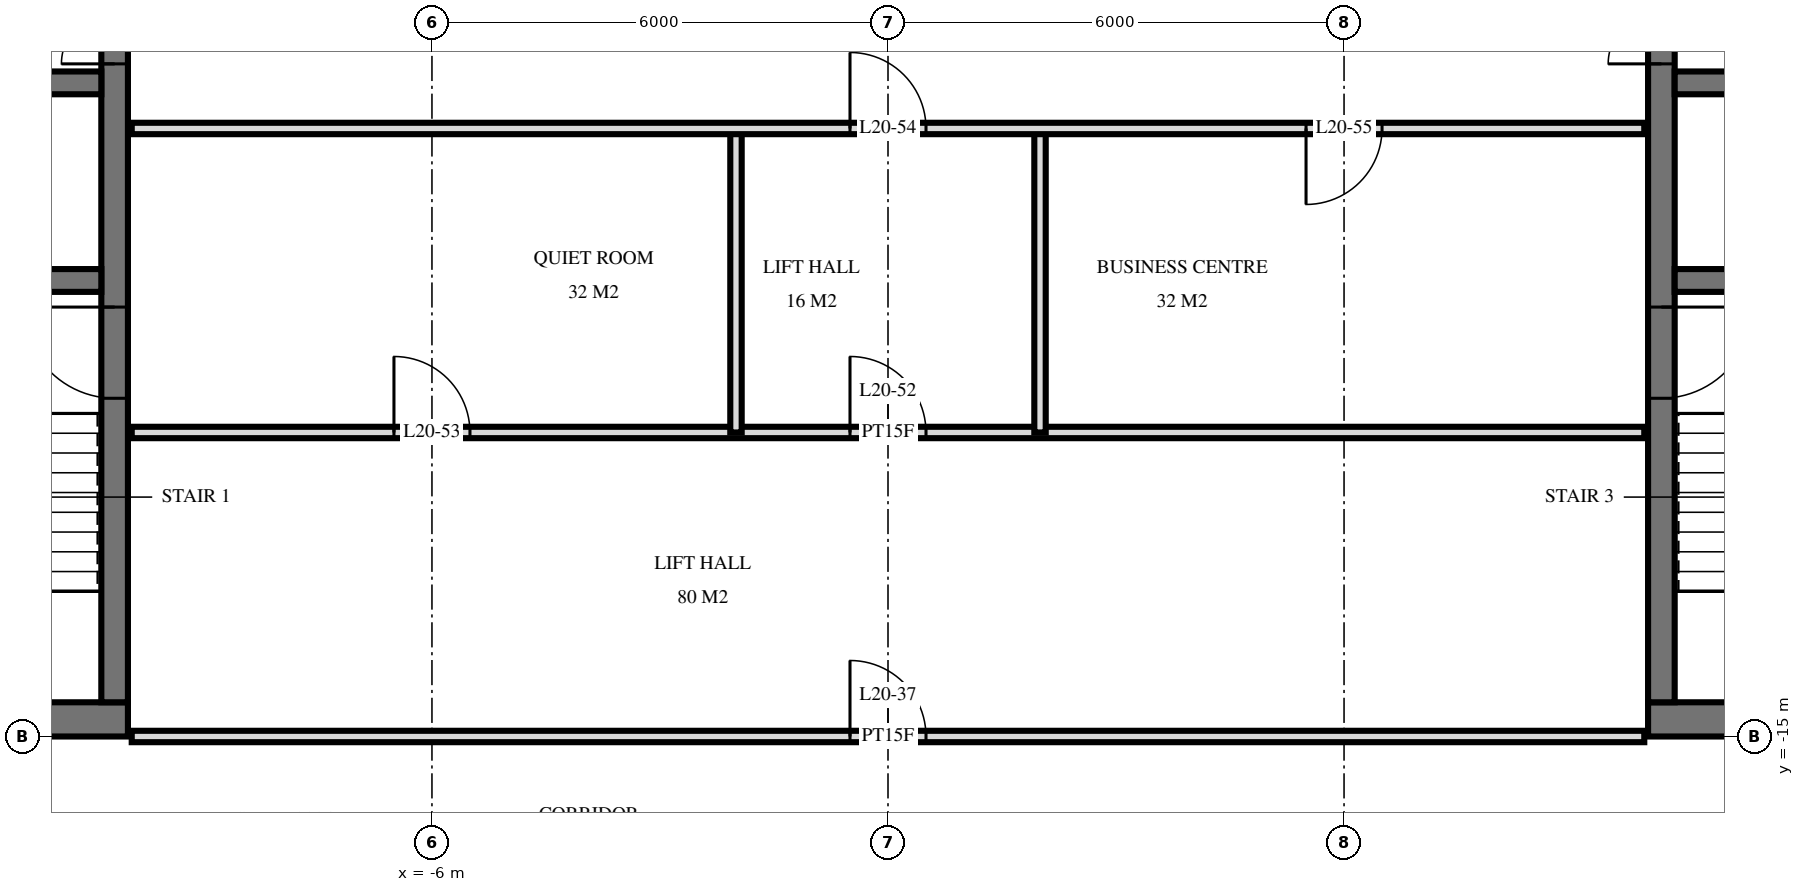
"""IFC4 building model, lengths in metres.
Left out: names, types, materials, properties, quantities, classifications, styles, units other than length and angle.
Written with IfcOpenShell. Run it as: python <this file> out.ifc"""

import sys

from ifc_helpers import new_model, si_unit, direction, frame, frame_2d, origin, place, context, subcontext, project, spatial, rectangle, extrude, element, fill, save


model = new_model("IFC4")
c1 = context("Model", 3, precision=1e-05, world=origin(), true_north=direction((0.0, 1.0)))
c2 = subcontext(c1, "Body", "Model", "MODEL_VIEW")
j1 = project(units=[si_unit("LENGTHUNIT", "METRE"), si_unit("PLANEANGLEUNIT", "RADIAN")], contexts=[c1])
p1 = place(None, origin())
s1 = spatial("IfcSite", under=j1, at=p1, CompositionType="ELEMENT")
p2 = place(p1, origin())
s2 = spatial("IfcBuilding", under=s1, at=p2, CompositionType="ELEMENT")
p3 = place(p2, frame((0.0, 0.0, 81.6)))
s3 = spatial("IfcBuildingStorey", under=s2, at=p3, CompositionType="ELEMENT", Elevation=81.6)
p4 = place(p3, frame((-29.5, -14.775, 0.0), z_axis=(0.0, 0.0, 1.0), x_axis=(1.0, 0.0, 0.0)))
e1 = element("IfcWall", 1, at=p4, inside=s3, PredefinedType="SHEAR", context=c2, shape_type="SweptSolid", body=[
    extrude(rectangle(XDim=19.5, YDim=0.45, at=frame_2d((9.75, 0.0))), origin(), (0.0, 0.0, 1.0), 3.6),
])
p5 = place(p4, frame((11.2, 0.0, 0.0)))
e2 = element("IfcOpeningElement", 2, at=p5, cuts=e1, PredefinedType="OPENING", context=c2, shape_type="SweptSolid", body=[
    extrude(rectangle(XDim=1.2, YDim=2.1, at=frame_2d((0.6, 1.05))), frame((0.0, 0.235, 0.0), z_axis=(0.0, -1.0, 0.0), x_axis=(1.0, 0.0, 0.0)), (0.0, 0.0, 1.0), 0.47),
])
p6 = place(p4, frame((14.25, 0.0, 0.0)))
e3 = element("IfcOpeningElement", 3, at=p6, cuts=e1, PredefinedType="OPENING", context=c2, shape_type="SweptSolid", body=[
    extrude(rectangle(XDim=1.1, YDim=2.1, at=frame_2d((0.55, 1.05))), frame((0.0, 0.235, 0.0), z_axis=(0.0, -1.0, 0.0), x_axis=(1.0, 0.0, 0.0)), (0.0, 0.0, 1.0), 0.47),
])
p7 = place(p4, frame((8.5, 0.0, 0.0)))
e4 = element("IfcOpeningElement", 4, at=p7, cuts=e1, PredefinedType="OPENING", context=c2, shape_type="SweptSolid", body=[
    extrude(rectangle(XDim=0.9, YDim=2.1, at=frame_2d((0.45, 1.05))), frame((0.0, 0.235, 0.0), z_axis=(0.0, -1.0, 0.0), x_axis=(1.0, 0.0, 0.0)), (0.0, 0.0, 1.0), 0.47),
])
p8 = place(p4, frame((6.05, 0.0, 0.0)))
e5 = element("IfcOpeningElement", 5, at=p8, cuts=e1, PredefinedType="OPENING", context=c2, shape_type="SweptSolid", body=[
    extrude(rectangle(XDim=1.0, YDim=2.1, at=frame_2d((0.5, 1.05))), frame((0.0, 0.235, 0.0), z_axis=(0.0, -1.0, 0.0), x_axis=(1.0, 0.0, 0.0)), (0.0, 0.0, 1.0), 0.47),
])
p9 = place(p4, frame((2.988, 0.0, 0.0)))
e6 = element("IfcOpeningElement", 6, at=p9, cuts=e1, PredefinedType="OPENING", context=c2, shape_type="SweptSolid", body=[
    extrude(rectangle(XDim=1.0, YDim=2.1, at=frame_2d((0.5, 1.05))), frame((0.0, 0.235, 0.0), z_axis=(0.0, -1.0, 0.0), x_axis=(1.0, 0.0, 0.0)), (0.0, 0.0, 1.0), 0.47),
])
p10 = place(p4, frame((0.663, 0.0, 0.0)))
e7 = element("IfcOpeningElement", 7, at=p10, cuts=e1, PredefinedType="OPENING", context=c2, shape_type="SweptSolid", body=[
    extrude(rectangle(XDim=1.0, YDim=2.1, at=frame_2d((0.5, 1.05))), frame((0.0, 0.235, 0.0), z_axis=(0.0, -1.0, 0.0), x_axis=(1.0, 0.0, 0.0)), (0.0, 0.0, 1.0), 0.47),
])
p11 = place(p3, frame((-10.175, -14.55, 0.0), z_axis=(0.0, 0.0, 1.0), x_axis=(0.0, 1.0, 0.0)))
e8 = element("IfcWall", 8, at=p11, inside=s3, PredefinedType="SHEAR", context=c2, shape_type="SweptSolid", body=[
    extrude(rectangle(XDim=14.1, YDim=0.35, at=frame_2d((7.05, 0.0))), origin(), (0.0, 0.0, 1.0), 3.6),
])
p12 = place(p11, frame((8.4, 0.0, 0.0)))
e9 = element("IfcOpeningElement", 9, at=p12, cuts=e8, PredefinedType="OPENING", context=c2, shape_type="SweptSolid", body=[
    extrude(rectangle(XDim=1.4, YDim=2.4, at=frame_2d((0.7, 1.2))), frame((0.0, 0.185, 0.0), z_axis=(0.0, -1.0, 0.0), x_axis=(1.0, 0.0, 0.0)), (0.0, 0.0, 1.0), 0.37),
])
p13 = place(p11, frame((10.0, 0.0, 0.0)))
e10 = element("IfcOpeningElement", 10, at=p13, cuts=e8, PredefinedType="OPENING", context=c2, shape_type="SweptSolid", body=[
    extrude(rectangle(XDim=1.4, YDim=2.4, at=frame_2d((0.7, 1.2))), frame((0.0, 0.185, 0.0), z_axis=(0.0, -1.0, 0.0), x_axis=(1.0, 0.0, 0.0)), (0.0, 0.0, 1.0), 0.37),
])
p14 = place(p11, frame((4.0, 0.0, 0.0)))
e11 = element("IfcOpeningElement", 11, at=p14, cuts=e8, PredefinedType="OPENING", context=c2, shape_type="SweptSolid", body=[
    extrude(rectangle(XDim=1.2, YDim=2.1, at=frame_2d((0.6, 1.05))), frame((0.0, 0.185, 0.0), z_axis=(0.0, -1.0, 0.0), x_axis=(1.0, 0.0, 0.0)), (0.0, 0.0, 1.0), 0.37),
])
p15 = place(p3, frame((-29.05, -6.4, 0.0), z_axis=(0.0, 0.0, 1.0), x_axis=(1.0, 0.0, 0.0)))
e12 = element("IfcWall", 12, at=p15, inside=s3, PredefinedType="SHEAR", context=c2, shape_type="SweptSolid", body=[
    extrude(rectangle(XDim=18.7, YDim=0.3, at=frame_2d((9.35, 0.0))), origin(), (0.0, 0.0, 1.0), 3.6),
])
p16 = place(p15, frame((2.95, 0.0, 0.0)))
e13 = element("IfcOpeningElement", 13, at=p16, cuts=e12, PredefinedType="OPENING", context=c2, shape_type="SweptSolid", body=[
    extrude(rectangle(XDim=1.1, YDim=2.1, at=frame_2d((0.55, 1.05))), frame((0.0, 0.16, 0.0), z_axis=(0.0, -1.0, 0.0), x_axis=(1.0, 0.0, 0.0)), (0.0, 0.0, 1.0), 0.32),
])
p17 = place(p15, frame((0.55, 0.0, 0.0)))
e14 = element("IfcOpeningElement", 14, at=p17, cuts=e12, PredefinedType="OPENING", context=c2, shape_type="SweptSolid", body=[
    extrude(rectangle(XDim=1.1, YDim=2.1, at=frame_2d((0.55, 1.05))), frame((0.0, 0.16, 0.0), z_axis=(0.0, -1.0, 0.0), x_axis=(1.0, 0.0, 0.0)), (0.0, 0.0, 1.0), 0.32),
])
p18 = place(p15, frame((10.8, 0.0, 0.0)))
e15 = element("IfcOpeningElement", 15, at=p18, cuts=e12, PredefinedType="OPENING", context=c2, shape_type="SweptSolid", body=[
    extrude(rectangle(XDim=1.1, YDim=2.1, at=frame_2d((0.55, 1.05))), frame((0.0, 0.16, 0.0), z_axis=(0.0, -1.0, 0.0), x_axis=(1.0, 0.0, 0.0)), (0.0, 0.0, 1.0), 0.32),
])
p19 = place(p15, frame((5.6, 0.0, 0.0)))
e16 = element("IfcOpeningElement", 16, at=p19, cuts=e12, PredefinedType="OPENING", context=c2, shape_type="SweptSolid", body=[
    extrude(rectangle(XDim=1.0, YDim=2.1, at=frame_2d((0.5, 1.05))), frame((0.0, 0.16, 0.0), z_axis=(0.0, -1.0, 0.0), x_axis=(1.0, 0.0, 0.0)), (0.0, 0.0, 1.0), 0.32),
])
p20 = place(p3, frame((-29.05, -9.0, 0.0), z_axis=(0.0, 0.0, 1.0), x_axis=(1.0, 0.0, 0.0)))
e17 = element("IfcWall", 17, at=p20, inside=s3, PredefinedType="SHEAR", context=c2, shape_type="SweptSolid", body=[
    extrude(rectangle(XDim=18.7, YDim=0.3, at=frame_2d((9.35, 0.0))), origin(), (0.0, 0.0, 1.0), 3.6),
])
p21 = place(p20, frame((13.8, 0.0, 0.0)))
e18 = element("IfcOpeningElement", 18, at=p21, cuts=e17, PredefinedType="OPENING", context=c2, shape_type="SweptSolid", body=[
    extrude(rectangle(XDim=1.1, YDim=2.1, at=frame_2d((0.55, 1.05))), frame((0.0, 0.16, 0.0), z_axis=(0.0, -1.0, 0.0), x_axis=(1.0, 0.0, 0.0)), (0.0, 0.0, 1.0), 0.32),
])
p22 = place(p3, frame((10.0, -14.775, 0.0), z_axis=(0.0, 0.0, 1.0), x_axis=(1.0, 0.0, 0.0)))
e19 = element("IfcWall", 19, at=p22, inside=s3, PredefinedType="SHEAR", context=c2, shape_type="SweptSolid", body=[
    extrude(rectangle(XDim=19.5, YDim=0.45, at=frame_2d((9.75, 0.0))), origin(), (0.0, 0.0, 1.0), 3.6),
])
p23 = place(p22, frame((7.1, 0.0, 0.0)))
e20 = element("IfcOpeningElement", 20, at=p23, cuts=e19, PredefinedType="OPENING", context=c2, shape_type="SweptSolid", body=[
    extrude(rectangle(XDim=1.2, YDim=2.1, at=frame_2d((0.6, 1.05))), frame((0.0, 0.235, 0.0), z_axis=(0.0, -1.0, 0.0), x_axis=(1.0, 0.0, 0.0)), (0.0, 0.0, 1.0), 0.47),
])
p24 = place(p22, frame((4.15, 0.0, 0.0)))
e21 = element("IfcOpeningElement", 21, at=p24, cuts=e19, PredefinedType="OPENING", context=c2, shape_type="SweptSolid", body=[
    extrude(rectangle(XDim=1.1, YDim=2.1, at=frame_2d((0.55, 1.05))), frame((0.0, 0.235, 0.0), z_axis=(0.0, -1.0, 0.0), x_axis=(1.0, 0.0, 0.0)), (0.0, 0.0, 1.0), 0.47),
])
p25 = place(p22, frame((10.1, 0.0, 0.0)))
e22 = element("IfcOpeningElement", 22, at=p25, cuts=e19, PredefinedType="OPENING", context=c2, shape_type="SweptSolid", body=[
    extrude(rectangle(XDim=0.9, YDim=2.1, at=frame_2d((0.45, 1.05))), frame((0.0, 0.235, 0.0), z_axis=(0.0, -1.0, 0.0), x_axis=(1.0, 0.0, 0.0)), (0.0, 0.0, 1.0), 0.47),
])
p26 = place(p22, frame((12.45, 0.0, 0.0)))
e23 = element("IfcOpeningElement", 23, at=p26, cuts=e19, PredefinedType="OPENING", context=c2, shape_type="SweptSolid", body=[
    extrude(rectangle(XDim=1.0, YDim=2.1, at=frame_2d((0.5, 1.05))), frame((0.0, 0.235, 0.0), z_axis=(0.0, -1.0, 0.0), x_axis=(1.0, 0.0, 0.0)), (0.0, 0.0, 1.0), 0.47),
])
p27 = place(p22, frame((15.512, 0.0, 0.0)))
e24 = element("IfcOpeningElement", 24, at=p27, cuts=e19, PredefinedType="OPENING", context=c2, shape_type="SweptSolid", body=[
    extrude(rectangle(XDim=1.0, YDim=2.1, at=frame_2d((0.5, 1.05))), frame((0.0, 0.235, 0.0), z_axis=(0.0, -1.0, 0.0), x_axis=(1.0, 0.0, 0.0)), (0.0, 0.0, 1.0), 0.47),
])
p28 = place(p22, frame((17.837, 0.0, 0.0)))
e25 = element("IfcOpeningElement", 25, at=p28, cuts=e19, PredefinedType="OPENING", context=c2, shape_type="SweptSolid", body=[
    extrude(rectangle(XDim=1.0, YDim=2.1, at=frame_2d((0.5, 1.05))), frame((0.0, 0.235, 0.0), z_axis=(0.0, -1.0, 0.0), x_axis=(1.0, 0.0, 0.0)), (0.0, 0.0, 1.0), 0.47),
])
p29 = place(p3, frame((10.175, -14.55, 0.0), z_axis=(0.0, 0.0, 1.0), x_axis=(0.0, 1.0, 0.0)))
e26 = element("IfcWall", 26, at=p29, inside=s3, PredefinedType="SHEAR", context=c2, shape_type="SweptSolid", body=[
    extrude(rectangle(XDim=14.1, YDim=0.35, at=frame_2d((7.05, 0.0))), origin(), (0.0, 0.0, 1.0), 3.6),
])
p30 = place(p29, frame((8.4, 0.0, 0.0)))
e27 = element("IfcOpeningElement", 27, at=p30, cuts=e26, PredefinedType="OPENING", context=c2, shape_type="SweptSolid", body=[
    extrude(rectangle(XDim=1.4, YDim=2.4, at=frame_2d((0.7, 1.2))), frame((0.0, 0.185, 0.0), z_axis=(0.0, -1.0, 0.0), x_axis=(1.0, 0.0, 0.0)), (0.0, 0.0, 1.0), 0.37),
])
p31 = place(p29, frame((10.0, 0.0, 0.0)))
e28 = element("IfcOpeningElement", 28, at=p31, cuts=e26, PredefinedType="OPENING", context=c2, shape_type="SweptSolid", body=[
    extrude(rectangle(XDim=1.4, YDim=2.4, at=frame_2d((0.7, 1.2))), frame((0.0, 0.185, 0.0), z_axis=(0.0, -1.0, 0.0), x_axis=(1.0, 0.0, 0.0)), (0.0, 0.0, 1.0), 0.37),
])
p32 = place(p29, frame((4.0, 0.0, 0.0)))
e29 = element("IfcOpeningElement", 29, at=p32, cuts=e26, PredefinedType="OPENING", context=c2, shape_type="SweptSolid", body=[
    extrude(rectangle(XDim=1.2, YDim=2.1, at=frame_2d((0.6, 1.05))), frame((0.0, 0.185, 0.0), z_axis=(0.0, -1.0, 0.0), x_axis=(1.0, 0.0, 0.0)), (0.0, 0.0, 1.0), 0.37),
])
p33 = place(p3, frame((10.35, -6.4, 0.0), z_axis=(0.0, 0.0, 1.0), x_axis=(1.0, 0.0, 0.0)))
e30 = element("IfcWall", 30, at=p33, inside=s3, PredefinedType="SHEAR", context=c2, shape_type="SweptSolid", body=[
    extrude(rectangle(XDim=18.7, YDim=0.3, at=frame_2d((9.35, 0.0))), origin(), (0.0, 0.0, 1.0), 3.6),
])
p34 = place(p33, frame((14.65, 0.0, 0.0)))
e31 = element("IfcOpeningElement", 31, at=p34, cuts=e30, PredefinedType="OPENING", context=c2, shape_type="SweptSolid", body=[
    extrude(rectangle(XDim=1.1, YDim=2.1, at=frame_2d((0.55, 1.05))), frame((0.0, 0.16, 0.0), z_axis=(0.0, -1.0, 0.0), x_axis=(1.0, 0.0, 0.0)), (0.0, 0.0, 1.0), 0.32),
])
p35 = place(p33, frame((17.05, 0.0, 0.0)))
e32 = element("IfcOpeningElement", 32, at=p35, cuts=e30, PredefinedType="OPENING", context=c2, shape_type="SweptSolid", body=[
    extrude(rectangle(XDim=1.1, YDim=2.1, at=frame_2d((0.55, 1.05))), frame((0.0, 0.16, 0.0), z_axis=(0.0, -1.0, 0.0), x_axis=(1.0, 0.0, 0.0)), (0.0, 0.0, 1.0), 0.32),
])
p36 = place(p33, frame((6.8, 0.0, 0.0)))
e33 = element("IfcOpeningElement", 33, at=p36, cuts=e30, PredefinedType="OPENING", context=c2, shape_type="SweptSolid", body=[
    extrude(rectangle(XDim=1.1, YDim=2.1, at=frame_2d((0.55, 1.05))), frame((0.0, 0.16, 0.0), z_axis=(0.0, -1.0, 0.0), x_axis=(1.0, 0.0, 0.0)), (0.0, 0.0, 1.0), 0.32),
])
p37 = place(p33, frame((12.1, 0.0, 0.0)))
e34 = element("IfcOpeningElement", 34, at=p37, cuts=e30, PredefinedType="OPENING", context=c2, shape_type="SweptSolid", body=[
    extrude(rectangle(XDim=1.0, YDim=2.1, at=frame_2d((0.5, 1.05))), frame((0.0, 0.16, 0.0), z_axis=(0.0, -1.0, 0.0), x_axis=(1.0, 0.0, 0.0)), (0.0, 0.0, 1.0), 0.32),
])
p38 = place(p3, frame((10.35, -9.0, 0.0), z_axis=(0.0, 0.0, 1.0), x_axis=(1.0, 0.0, 0.0)))
e35 = element("IfcWall", 35, at=p38, inside=s3, PredefinedType="SHEAR", context=c2, shape_type="SweptSolid", body=[
    extrude(rectangle(XDim=18.7, YDim=0.3, at=frame_2d((9.35, 0.0))), origin(), (0.0, 0.0, 1.0), 3.6),
])
p39 = place(p38, frame((3.8, 0.0, 0.0)))
e36 = element("IfcOpeningElement", 36, at=p39, cuts=e35, PredefinedType="OPENING", context=c2, shape_type="SweptSolid", body=[
    extrude(rectangle(XDim=1.1, YDim=2.1, at=frame_2d((0.55, 1.05))), frame((0.0, 0.16, 0.0), z_axis=(0.0, -1.0, 0.0), x_axis=(1.0, 0.0, 0.0)), (0.0, 0.0, 1.0), 0.32),
])
for number, where, z_axis, x_axis in (
    (37, (2.0, -11.0, 0.0), (0.0, 0.0, 1.0), (0.0, 1.0, 0.0)),
    (38, (-2.0, -11.0, 0.0), (0.0, 0.0, 1.0), (0.0, 1.0, 0.0)),
):
    element("IfcWall", number, at=place(p3, frame(where, z_axis=z_axis, x_axis=x_axis)), inside=s3, PredefinedType="PARTITIONING", context=c2, shape_type="SweptSolid", body=[
        extrude(rectangle(XDim=4.0, YDim=0.15, at=frame_2d((2.0, 0.0))), origin(), (0.0, 0.0, 1.0), 3.32),
    ])
p40 = place(p3, frame((-9.95, -15.0, 0.0), z_axis=(0.0, 0.0, 1.0), x_axis=(1.0, 0.0, 0.0)))
e39 = element("IfcWall", 39, at=p40, inside=s3, PredefinedType="PARTITIONING", context=c2, shape_type="SweptSolid", body=[
    extrude(rectangle(XDim=19.9, YDim=0.15, at=frame_2d((9.95, 0.0))), origin(), (0.0, 0.0, 1.0), 2.684),
])
p41 = place(p40, frame((9.45, 0.0, 0.0)))
e40 = element("IfcOpeningElement", 40, at=p41, cuts=e39, PredefinedType="OPENING", context=c2, shape_type="SweptSolid", body=[
    extrude(rectangle(XDim=1.0, YDim=2.1, at=frame_2d((0.5, 1.05))), frame((0.0, 0.085, 0.0), z_axis=(0.0, -1.0, 0.0), x_axis=(1.0, 0.0, 0.0)), (0.0, 0.0, 1.0), 0.17),
])
p42 = place(p3, frame((-9.95, -11.0, 0.0), z_axis=(0.0, 0.0, 1.0), x_axis=(1.0, 0.0, 0.0)))
e41 = element("IfcWall", 41, at=p42, inside=s3, PredefinedType="PARTITIONING", context=c2, shape_type="SweptSolid", body=[
    extrude(rectangle(XDim=19.9, YDim=0.15, at=frame_2d((9.95, 0.0))), origin(), (0.0, 0.0, 1.0), 3.32),
])
p43 = place(p42, frame((9.45, 0.0, 0.0)))
e42 = element("IfcOpeningElement", 42, at=p43, cuts=e41, PredefinedType="OPENING", context=c2, shape_type="SweptSolid", body=[
    extrude(rectangle(XDim=1.0, YDim=2.1, at=frame_2d((0.5, 1.05))), frame((0.0, 0.085, 0.0), z_axis=(0.0, -1.0, 0.0), x_axis=(1.0, 0.0, 0.0)), (0.0, 0.0, 1.0), 0.17),
])
p44 = place(p42, frame((3.45, 0.0, 0.0)))
e43 = element("IfcOpeningElement", 43, at=p44, cuts=e41, PredefinedType="OPENING", context=c2, shape_type="SweptSolid", body=[
    extrude(rectangle(XDim=1.0, YDim=2.1, at=frame_2d((0.5, 1.05))), frame((0.0, 0.085, 0.0), z_axis=(0.0, -1.0, 0.0), x_axis=(1.0, 0.0, 0.0)), (0.0, 0.0, 1.0), 0.17),
])
p45 = place(p3, frame((-9.95, -7.0, 0.0), z_axis=(0.0, 0.0, 1.0), x_axis=(1.0, 0.0, 0.0)))
e44 = element("IfcWall", 44, at=p45, inside=s3, PredefinedType="PARTITIONING", context=c2, shape_type="SweptSolid", body=[
    extrude(rectangle(XDim=19.9, YDim=0.15, at=frame_2d((9.95, 0.0))), origin(), (0.0, 0.0, 1.0), 3.32),
])
p46 = place(p45, frame((9.45, 0.0, 0.0)))
e45 = element("IfcOpeningElement", 45, at=p46, cuts=e44, PredefinedType="OPENING", context=c2, shape_type="SweptSolid", body=[
    extrude(rectangle(XDim=1.0, YDim=2.1, at=frame_2d((0.5, 1.05))), frame((0.0, 0.085, 0.0), z_axis=(0.0, -1.0, 0.0), x_axis=(1.0, 0.0, 0.0)), (0.0, 0.0, 1.0), 0.17),
])
p47 = place(p45, frame((15.45, 0.0, 0.0)))
e46 = element("IfcOpeningElement", 46, at=p47, cuts=e44, PredefinedType="OPENING", context=c2, shape_type="SweptSolid", body=[
    extrude(rectangle(XDim=1.0, YDim=2.1, at=frame_2d((0.5, 1.05))), frame((0.0, 0.085, 0.0), z_axis=(0.0, -1.0, 0.0), x_axis=(1.0, 0.0, 0.0)), (0.0, 0.0, 1.0), 0.17),
])
p48 = place(p12, origin())
e47 = element("IfcDoor", 47, at=p48, inside=s3, OperationType="DOUBLE_DOOR_SINGLE_SWING", PredefinedType="DOOR", context=c2, shape_type="SweptSolid", body=[
    extrude(rectangle(XDim=1.4, YDim=2.4, at=frame_2d((0.7, 1.2))), frame((0.0, 0.025, 0.0), z_axis=(0.0, -1.0, 0.0), x_axis=(1.0, 0.0, 0.0)), (0.0, 0.0, 1.0), 0.05),
])
fill(e9, e47)
p49 = place(p14, origin())
e48 = element("IfcDoor", 48, at=p49, inside=s3, OperationType="SINGLE_SWING_LEFT", PredefinedType="DOOR", context=c2, shape_type="SweptSolid", body=[
    extrude(rectangle(XDim=1.2, YDim=2.1, at=frame_2d((0.6, 1.05))), frame((0.0, 0.025, 0.0), z_axis=(0.0, -1.0, 0.0), x_axis=(1.0, 0.0, 0.0)), (0.0, 0.0, 1.0), 0.05),
])
fill(e11, e48)
p50 = place(p30, origin())
e49 = element("IfcDoor", 49, at=p50, inside=s3, OperationType="DOUBLE_DOOR_SINGLE_SWING", PredefinedType="DOOR", context=c2, shape_type="SweptSolid", body=[
    extrude(rectangle(XDim=1.4, YDim=2.4, at=frame_2d((0.7, 1.2))), frame((0.0, 0.025, 0.0), z_axis=(0.0, -1.0, 0.0), x_axis=(1.0, 0.0, 0.0)), (0.0, 0.0, 1.0), 0.05),
])
fill(e27, e49)
p51 = place(p32, frame((0.6, 0.0, 0.0), z_axis=(0.0, 0.0, 1.0), x_axis=(-1.0, 0.0, 0.0)))
e50 = element("IfcDoor", 50, at=p51, inside=s3, OperationType="SINGLE_SWING_RIGHT", PredefinedType="DOOR", context=c2, shape_type="SweptSolid", body=[
    extrude(rectangle(XDim=1.2, YDim=2.1, at=frame_2d((0.0, 1.05))), frame((0.0, -0.025, 0.0), z_axis=(0.0, 1.0, 0.0), x_axis=(-1.0, 0.0, 0.0)), (0.0, 0.0, 1.0), 0.05),
])
fill(e29, e50)
p52 = place(p41, origin())
e51 = element("IfcDoor", 51, at=p52, inside=s3, OperationType="SINGLE_SWING_RIGHT", PredefinedType="DOOR", context=c2, shape_type="SweptSolid", body=[
    extrude(rectangle(XDim=1.0, YDim=2.1, at=frame_2d((0.5, 1.05))), frame((0.0, 0.025, 0.0), z_axis=(0.0, -1.0, 0.0), x_axis=(1.0, 0.0, 0.0)), (0.0, 0.0, 1.0), 0.05),
])
fill(e40, e51)
p53 = place(p43, origin())
e52 = element("IfcDoor", 52, at=p53, inside=s3, OperationType="SINGLE_SWING_RIGHT", PredefinedType="DOOR", context=c2, shape_type="SweptSolid", body=[
    extrude(rectangle(XDim=1.0, YDim=2.1, at=frame_2d((0.5, 1.05))), frame((0.0, 0.025, 0.0), z_axis=(0.0, -1.0, 0.0), x_axis=(1.0, 0.0, 0.0)), (0.0, 0.0, 1.0), 0.05),
])
fill(e42, e52)
p54 = place(p44, origin())
e53 = element("IfcDoor", 53, at=p54, inside=s3, OperationType="SINGLE_SWING_RIGHT", PredefinedType="DOOR", context=c2, shape_type="SweptSolid", body=[
    extrude(rectangle(XDim=1.0, YDim=2.1, at=frame_2d((0.5, 1.05))), frame((0.0, 0.025, 0.0), z_axis=(0.0, -1.0, 0.0), x_axis=(1.0, 0.0, 0.0)), (0.0, 0.0, 1.0), 0.05),
])
fill(e43, e53)
p55 = place(p46, origin())
e54 = element("IfcDoor", 54, at=p55, inside=s3, OperationType="SINGLE_SWING_RIGHT", PredefinedType="DOOR", context=c2, shape_type="SweptSolid", body=[
    extrude(rectangle(XDim=1.0, YDim=2.1, at=frame_2d((0.5, 1.05))), frame((0.0, 0.025, 0.0), z_axis=(0.0, -1.0, 0.0), x_axis=(1.0, 0.0, 0.0)), (0.0, 0.0, 1.0), 0.05),
])
fill(e45, e54)
p56 = place(p47, frame((0.5, 0.0, 0.0), z_axis=(0.0, 0.0, 1.0), x_axis=(-1.0, 0.0, 0.0)))
e55 = element("IfcDoor", 55, at=p56, inside=s3, OperationType="SINGLE_SWING_LEFT", PredefinedType="DOOR", context=c2, shape_type="SweptSolid", body=[
    extrude(rectangle(XDim=1.0, YDim=2.1, at=frame_2d((0.0, 1.05))), frame((0.0, -0.025, 0.0), z_axis=(0.0, 1.0, 0.0), x_axis=(-1.0, 0.0, 0.0)), (0.0, 0.0, 1.0), 0.05),
])
fill(e46, e55)
save(model, sys.argv[1])
